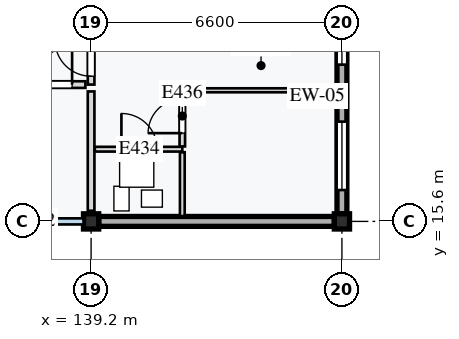
"""IFC4 building model, lengths in metres.
Left out: names, types, materials, properties, quantities, classifications, styles, units other than length and angle.
Written with IfcOpenShell. Run it as: python <this file> out.ifc"""

import sys

from ifc_helpers import new_model, si_unit, direction, frame, frame_2d, origin, origin_2d, place, context, subcontext, project, spatial, rectangle, extrude, element, fill, save


model = new_model("IFC4")
c1 = context("Model", 3, precision=1e-05, world=origin(), true_north=direction((0.0, 1.0)))
c2 = subcontext(c1, "Body", "Model", "MODEL_VIEW")
j1 = project(units=[si_unit("LENGTHUNIT", "METRE"), si_unit("PLANEANGLEUNIT", "RADIAN")], contexts=[c1])
p1 = place(None, origin())
s1 = spatial("IfcSite", under=j1, at=p1, CompositionType="ELEMENT")
p2 = place(p1, origin())
s2 = spatial("IfcBuilding", under=s1, at=p2, CompositionType="ELEMENT")
p3 = place(p2, frame((0.0, 0.0, 37.2)))
s3 = spatial("IfcBuildingStorey", under=s2, at=p3, CompositionType="ELEMENT", Elevation=37.2)
for number, where, z_axis, x_axis in (
    (1, (139.2, 15.6, 0.0), (0.0, 0.0, 1.0), (1.0, 0.0, 0.0)),
    (2, (145.8, 15.6, 0.0), (0.0, 0.0, 1.0), (1.0, 0.0, 0.0)),
):
    element("IfcColumn", number, at=place(p3, frame(where, z_axis=z_axis, x_axis=x_axis)), inside=s3, PredefinedType="COLUMN", context=c2, shape_type="SweptSolid", body=[
        extrude(rectangle(XDim=0.4, YDim=0.4, at=origin_2d()), origin(), (0.0, 0.0, 1.0), 3.2),
    ])
p4 = place(p3, frame((145.8, 15.8, 0.0), z_axis=(0.0, 0.0, 1.0), x_axis=(0.0, 1.0, 0.0)))
e3 = element("IfcWall", 3, at=p4, inside=s3, PredefinedType="STANDARD", context=c2, shape_type="SweptSolid", body=[
    extrude(rectangle(XDim=6.2, YDim=0.26, at=frame_2d((3.1, 0.0))), origin(), (0.0, 0.0, 1.0), 2.65),
])
p5 = place(p4, frame((0.625, 0.0, 0.85)))
e4 = element("IfcOpeningElement", 4, at=p5, cuts=e3, PredefinedType="OPENING", context=c2, shape_type="SweptSolid", body=[
    extrude(rectangle(XDim=1.8, YDim=1.35, at=frame_2d((0.9, 0.675))), frame((0.0, 0.14, 0.0), z_axis=(0.0, -1.0, 0.0), x_axis=(1.0, 0.0, 0.0)), (0.0, 0.0, 1.0), 0.28),
])
p6 = place(p4, frame((3.925, 0.0, 0.85)))
e5 = element("IfcOpeningElement", 5, at=p6, cuts=e3, PredefinedType="OPENING", context=c2, shape_type="SweptSolid", body=[
    extrude(rectangle(XDim=1.8, YDim=1.55, at=frame_2d((0.9, 0.775))), frame((0.0, 0.14, 0.0), z_axis=(0.0, -1.0, 0.0), x_axis=(1.0, 0.0, 0.0)), (0.0, 0.0, 1.0), 0.28),
])
p7 = place(p3, frame((139.4, 15.6, 0.0), z_axis=(0.0, 0.0, 1.0), x_axis=(1.0, 0.0, 0.0)))
e6 = element("IfcWall", 6, at=p7, inside=s3, PredefinedType="STANDARD", context=c2, shape_type="SweptSolid", body=[
    extrude(rectangle(XDim=6.2, YDim=0.26, at=frame_2d((3.1, 0.0))), origin(), (0.0, 0.0, 1.0), 2.65),
])
p8 = place(p3, frame((136.05, 19.2, 0.0), z_axis=(0.0, 0.0, 1.0), x_axis=(1.0, 0.0, 0.0)))
e7 = element("IfcWall", 7, at=p8, inside=s3, PredefinedType="PARTITIONING", context=c2, shape_type="SweptSolid", body=[
    extrude(rectangle(XDim=3.0, YDim=0.175, at=frame_2d((1.5, 0.0))), origin(), (0.0, 0.0, 1.0), 2.97),
])
p9 = place(p8, frame((1.65, 0.0, 0.0)))
e8 = element("IfcOpeningElement", 8, at=p9, cuts=e7, PredefinedType="OPENING", context=c2, shape_type="SweptSolid", body=[
    extrude(rectangle(XDim=1.0, YDim=2.1, at=frame_2d((0.5, 1.05))), frame((0.0, 0.097, 0.0), z_axis=(0.0, -1.0, 0.0), x_axis=(1.0, 0.0, 0.0)), (0.0, 0.0, 1.0), 0.195),
])
p10 = place(p3, frame((139.2, 15.88, 0.0), z_axis=(0.0, 0.0, 1.0), x_axis=(0.0, 1.0, 0.0)))
e9 = element("IfcWall", 9, at=p10, inside=s3, PredefinedType="PARTITIONING", context=c2, shape_type="SweptSolid", body=[
    extrude(rectangle(XDim=3.14, YDim=0.175, at=frame_2d((1.57, 0.0))), origin(), (0.0, 0.0, 1.0), 2.55),
])
p11 = place(p3, frame((139.2, 19.2, 0.0), z_axis=(0.0, 0.0, 1.0), x_axis=(0.0, 1.0, 0.0)))
e10 = element("IfcWall", 10, at=p11, inside=s3, PredefinedType="PARTITIONING", context=c2, shape_type="SweptSolid", body=[
    extrude(rectangle(XDim=3.0, YDim=0.175, at=frame_2d((1.5, 0.0))), origin(), (0.0, 0.0, 1.0), 2.55),
])
p12 = place(p11, frame((0.22, 0.0, 0.0)))
e11 = element("IfcOpeningElement", 11, at=p12, cuts=e10, PredefinedType="OPENING", context=c2, shape_type="SweptSolid", body=[
    extrude(rectangle(XDim=0.95, YDim=2.1, at=frame_2d((0.475, 1.05))), frame((0.0, 0.097, 0.0), z_axis=(0.0, -1.0, 0.0), x_axis=(1.0, 0.0, 0.0)), (0.0, 0.0, 1.0), 0.195),
])
p13 = place(p3, frame((139.298, 17.5, 0.0), z_axis=(0.0, 0.0, 1.0), x_axis=(1.0, 0.0, 0.0)))
e12 = element("IfcWall", 12, at=p13, inside=s3, PredefinedType="PARTITIONING", context=c2, shape_type="SweptSolid", body=[
    extrude(rectangle(XDim=2.302, YDim=0.125, at=frame_2d((1.151, 0.0))), origin(), (0.0, 0.0, 1.0), 2.97),
])
p14 = place(p13, frame((0.7, 0.0, 0.0)))
e13 = element("IfcOpeningElement", 13, at=p14, cuts=e12, PredefinedType="OPENING", context=c2, shape_type="SweptSolid", body=[
    extrude(rectangle(XDim=0.94, YDim=2.08, at=frame_2d((0.47, 1.04))), frame((0.0, 0.073, 0.0), z_axis=(0.0, -1.0, 0.0), x_axis=(1.0, 0.0, 0.0)), (0.0, 0.0, 1.0), 0.145),
])
p15 = place(p3, frame((141.6, 15.74, 0.0), z_axis=(0.0, 0.0, 1.0), x_axis=(0.0, 1.0, 0.0)))
e14 = element("IfcWall", 14, at=p15, inside=s3, PredefinedType="PARTITIONING", context=c2, shape_type="SweptSolid", body=[
    extrude(rectangle(XDim=1.68, YDim=0.125, at=frame_2d((0.84, 0.0))), origin(), (0.0, 0.0, 1.0), 2.97),
])
p16 = place(p3, frame((141.6, 17.573, 0.0), z_axis=(0.0, 0.0, 1.0), x_axis=(0.0, 1.0, 0.0)))
e15 = element("IfcWall", 15, at=p16, inside=s3, PredefinedType="PARTITIONING", context=c2, shape_type="SweptSolid", body=[
    extrude(rectangle(XDim=1.478, YDim=0.145, at=frame_2d((0.739, 0.0))), origin(), (0.0, 0.0, 1.0), 2.97),
])
p17 = place(p16, frame((0.35, 0.0, 0.0)))
e16 = element("IfcOpeningElement", 16, at=p17, cuts=e15, PredefinedType="OPENING", context=c2, shape_type="SweptSolid", body=[
    extrude(rectangle(XDim=0.9, YDim=2.1, at=frame_2d((0.45, 1.05))), frame((0.0, 0.083, 0.0), z_axis=(0.0, -1.0, 0.0), x_axis=(1.0, 0.0, 0.0)), (0.0, 0.0, 1.0), 0.165),
])
p18 = place(p3, frame((141.683, 19.05, 0.0), z_axis=(0.0, 0.0, 1.0), x_axis=(1.0, 0.0, 0.0)))
e17 = element("IfcWall", 17, at=p18, inside=s3, PredefinedType="PARTITIONING", context=c2, shape_type="SweptSolid", body=[
    extrude(rectangle(XDim=3.977, YDim=0.105, at=frame_2d((1.989, 0.0))), origin(), (0.0, 0.0, 1.0), 2.97),
])
p19 = place(p5, origin())
e18 = element("IfcWindow", 18, at=p19, inside=s3, PartitioningType="SINGLE_PANEL", PredefinedType="WINDOW", context=c2, shape_type="SweptSolid", body=[
    extrude(rectangle(XDim=1.8, YDim=1.35, at=frame_2d((0.9, 0.675))), frame((0.0, 0.03, 0.0), z_axis=(0.0, -1.0, 0.0), x_axis=(1.0, 0.0, 0.0)), (0.0, 0.0, 1.0), 0.06),
])
fill(e4, e18)
p20 = place(p6, origin())
e19 = element("IfcWindow", 19, at=p20, inside=s3, PartitioningType="SINGLE_PANEL", PredefinedType="WINDOW", context=c2, shape_type="SweptSolid", body=[
    extrude(rectangle(XDim=1.8, YDim=1.55, at=frame_2d((0.9, 0.775))), frame((0.0, 0.03, 0.0), z_axis=(0.0, -1.0, 0.0), x_axis=(1.0, 0.0, 0.0)), (0.0, 0.0, 1.0), 0.06),
])
fill(e5, e19)
p21 = place(p9, origin())
e20 = element("IfcDoor", 20, at=p21, inside=s3, OperationType="SINGLE_SWING_RIGHT", PredefinedType="DOOR", context=c2, shape_type="SweptSolid", body=[
    extrude(rectangle(XDim=1.0, YDim=2.1, at=frame_2d((0.5, 1.05))), frame((0.0, 0.025, 0.0), z_axis=(0.0, -1.0, 0.0), x_axis=(1.0, 0.0, 0.0)), (0.0, 0.0, 1.0), 0.05),
])
fill(e8, e20)
p22 = place(p12, origin())
e21 = element("IfcDoor", 21, at=p22, inside=s3, OperationType="SINGLE_SWING_RIGHT", PredefinedType="DOOR", context=c2, shape_type="SweptSolid", body=[
    extrude(rectangle(XDim=0.95, YDim=2.1, at=frame_2d((0.475, 1.05))), frame((0.0, 0.025, 0.0), z_axis=(0.0, -1.0, 0.0), x_axis=(1.0, 0.0, 0.0)), (0.0, 0.0, 1.0), 0.05),
])
fill(e11, e21)
p23 = place(p14, origin())
e22 = element("IfcDoor", 22, at=p23, inside=s3, OperationType="SINGLE_SWING_LEFT", PredefinedType="DOOR", context=c2, shape_type="SweptSolid", body=[
    extrude(rectangle(XDim=0.94, YDim=2.08, at=frame_2d((0.47, 1.04))), frame((0.0, 0.025, 0.0), z_axis=(0.0, -1.0, 0.0), x_axis=(1.0, 0.0, 0.0)), (0.0, 0.0, 1.0), 0.05),
])
fill(e13, e22)
p24 = place(p17, origin())
e23 = element("IfcDoor", 23, at=p24, inside=s3, OperationType="SINGLE_SWING_LEFT", PredefinedType="DOOR", context=c2, shape_type="SweptSolid", body=[
    extrude(rectangle(XDim=0.9, YDim=2.1, at=frame_2d((0.45, 1.05))), frame((0.0, 0.025, 0.0), z_axis=(0.0, -1.0, 0.0), x_axis=(1.0, 0.0, 0.0)), (0.0, 0.0, 1.0), 0.05),
])
fill(e16, e23)
save(model, sys.argv[1])
